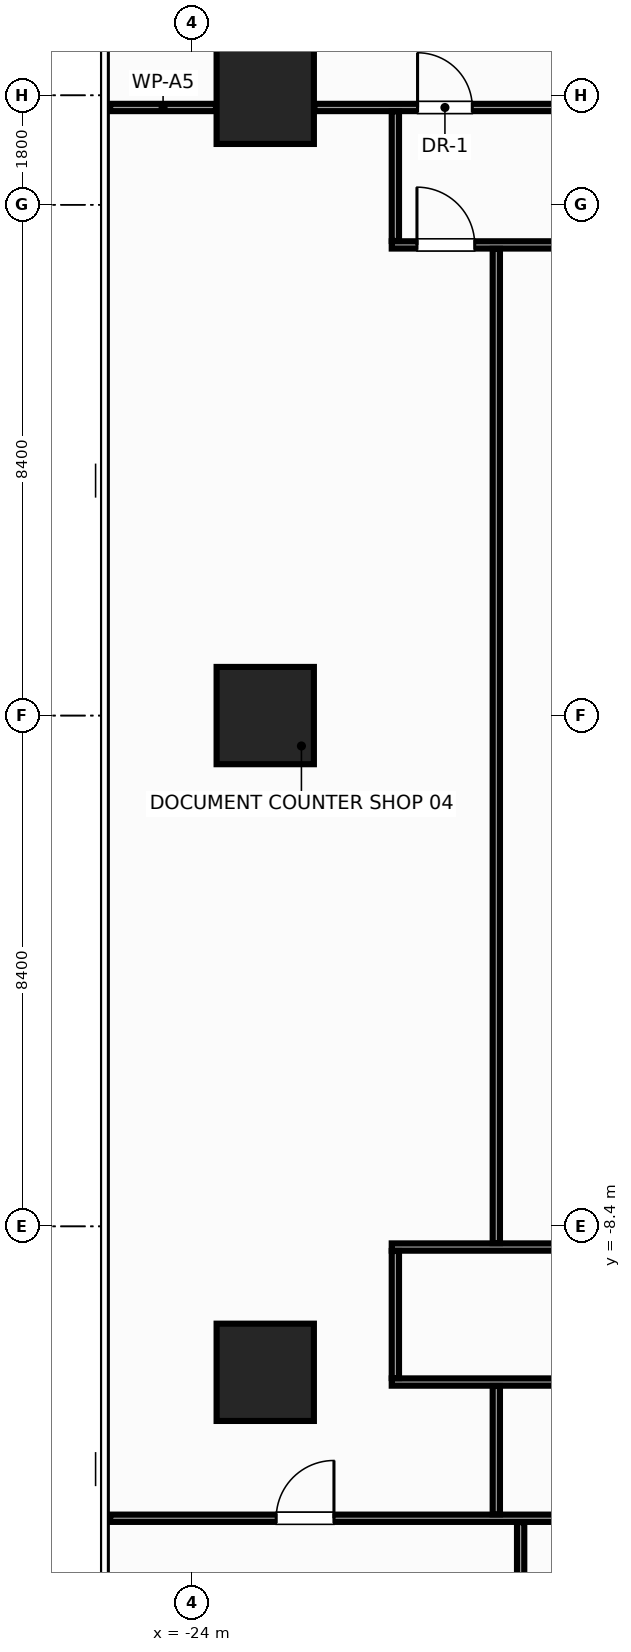
"""IFC4 building model, lengths in metres.
Left out: names, types, materials, properties, quantities, classifications, styles, units other than length and angle.
Written with IfcOpenShell. Run it as: python <this file> out.ifc"""

import sys

from ifc_helpers import new_model, si_unit, direction, frame, frame_2d, origin, origin_2d, place, context, subcontext, project, spatial, rectangle, extrude, source, transform, mapped, element, fill, save


model = new_model("IFC4")
c1 = context("Model", 3, precision=1e-05, world=origin(), true_north=direction((0.0, 1.0)))
c2 = subcontext(c1, "Body", "Model", "MODEL_VIEW")
j1 = project(units=[si_unit("LENGTHUNIT", "METRE"), si_unit("PLANEANGLEUNIT", "RADIAN")], contexts=[c1])
p1 = place(None, origin())
s1 = spatial("IfcSite", under=j1, at=p1, CompositionType="ELEMENT")
p2 = place(p1, origin())
s2 = spatial("IfcBuilding", under=s1, at=p2, CompositionType="ELEMENT")
p3 = place(p2, frame((0.0, 0.0, 88.4)))
s3 = spatial("IfcBuildingStorey", under=s2, at=p3, CompositionType="ELEMENT", Elevation=88.4)
m1 = source(origin(), c2, "Body", "SweptSolid", [
    extrude(rectangle(XDim=1.6, YDim=1.6, at=origin_2d()), origin(), (0.0, 0.0, 1.0), 3.6),
])
for number, where, z_axis, x_axis in (
    (1, (-22.8, -10.8, 0.0), (0.0, 0.0, 1.0), (1.0, 0.0, 0.0)),
    (2, (-22.8, 0.0, 0.0), (0.0, 0.0, 1.0), (1.0, 0.0, 0.0)),
    (3, (-22.8, 10.2, 0.0), (0.0, 0.0, 1.0), (1.0, 0.0, 0.0)),
):
    element("IfcColumn", number, at=place(p3, frame(where, z_axis=z_axis, x_axis=x_axis)), inside=s3, PredefinedType="COLUMN", context=c2, shape_type="MappedRepresentation", body=[
        mapped(m1, transform((0.0, 0.0, 0.0), x_axis=(1.0, 0.0, 0.0), y_axis=(0.0, 1.0, 0.0), z_axis=(0.0, 0.0, 1.0), scale=1.0)),
    ])
m2 = source(origin(), c2, "Body", "SweptSolid", [
    extrude(rectangle(XDim=1.74, YDim=0.12, at=frame_2d((0.87, 0.0))), origin(), (0.0, 0.0, 1.0), 3.36),
])
p4 = place(p3, frame((-25.35, 10.0, 0.0), z_axis=(0.0, 0.0, 1.0), x_axis=(1.0, 0.0, 0.0)))
e4 = element("IfcWall", 4, at=p4, inside=s3, PredefinedType="PARTITIONING", context=c2, shape_type="MappedRepresentation", body=[
    mapped(m2, transform((0.0, 0.0, 0.0), x_axis=(1.0, 0.0, 0.0), y_axis=(0.0, 1.0, 0.0), z_axis=(0.0, 0.0, 1.0), scale=1.0)),
])
m3 = source(origin(), c2, "Body", "SweptSolid", [
    extrude(rectangle(XDim=4.38, YDim=0.12, at=frame_2d((2.19, 0.0))), origin(), (0.0, 0.0, 1.0), 2.745),
])
p5 = place(p3, frame((-21.99, 10.0, 0.0), z_axis=(0.0, 0.0, 1.0), x_axis=(1.0, 0.0, 0.0)))
e5 = element("IfcWall", 5, at=p5, inside=s3, PredefinedType="PARTITIONING", context=c2, shape_type="MappedRepresentation", body=[
    mapped(m3, transform((0.0, 0.0, 0.0), x_axis=(1.0, 0.0, 0.0), y_axis=(0.0, 1.0, 0.0), z_axis=(0.0, 0.0, 1.0), scale=1.0)),
])
p6 = place(p5, frame((1.695, 0.0, 0.0)))
e6 = element("IfcOpeningElement", 6, at=p6, cuts=e5, PredefinedType="OPENING", context=c2, shape_type="SweptSolid", body=[
    extrude(rectangle(XDim=0.9, YDim=2.15, at=frame_2d((0.45, 1.075))), frame((0.0, 0.072, 0.0), z_axis=(0.0, -1.0, 0.0), x_axis=(1.0, 0.0, 0.0)), (0.0, 0.0, 1.0), 0.144),
])
m4 = source(origin(), c2, "Body", "SweptSolid", [
    extrude(rectangle(XDim=16.8, YDim=0.12, at=frame_2d((8.4, 0.0))), origin(), (0.0, 0.0, 1.0), 2.745),
])
p7 = place(p3, frame((-20.72, 7.74, 0.0), z_axis=(0.0, 0.0, 1.0), x_axis=(1.0, 0.0, 0.0)))
e7 = element("IfcWall", 7, at=p7, inside=s3, PredefinedType="PARTITIONING", context=c2, shape_type="MappedRepresentation", body=[
    mapped(m4, transform((0.0, 0.0, 0.0), x_axis=(1.0, 0.0, 0.0), y_axis=(0.0, 1.0, 0.0), z_axis=(0.0, 0.0, 1.0), scale=1.0)),
])
p8 = place(p7, frame((8.825, 0.0, 0.0)))
e8 = element("IfcOpeningElement", 8, at=p8, cuts=e7, PredefinedType="OPENING", context=c2, shape_type="SweptSolid", body=[
    extrude(rectangle(XDim=0.95, YDim=2.15, at=frame_2d((0.475, 1.075))), frame((0.0, 0.072, 0.0), z_axis=(0.0, -1.0, 0.0), x_axis=(1.0, 0.0, 0.0)), (0.0, 0.0, 1.0), 0.144),
])
p9 = place(p7, frame((0.415, 0.0, 0.0)))
e9 = element("IfcOpeningElement", 9, at=p9, cuts=e7, PredefinedType="OPENING", context=c2, shape_type="SweptSolid", body=[
    extrude(rectangle(XDim=0.95, YDim=2.15, at=frame_2d((0.475, 1.075))), frame((0.0, 0.072, 0.0), z_axis=(0.0, -1.0, 0.0), x_axis=(1.0, 0.0, 0.0)), (0.0, 0.0, 1.0), 0.144),
])
p10 = place(p3, frame((-20.72, -8.74, 0.0), z_axis=(0.0, 0.0, 1.0), x_axis=(1.0, 0.0, 0.0)))
e10 = element("IfcWall", 10, at=p10, inside=s3, PredefinedType="PARTITIONING", context=c2, shape_type="MappedRepresentation", body=[
    mapped(m4, transform((0.0, 0.0, 0.0), x_axis=(1.0, 0.0, 0.0), y_axis=(0.0, 1.0, 0.0), z_axis=(0.0, 0.0, 1.0), scale=1.0)),
])
m5 = source(origin(), c2, "Body", "SweptSolid", [
    extrude(rectangle(XDim=3.11, YDim=0.12, at=frame_2d((1.555, 0.0))), origin(), (0.0, 0.0, 1.0), 2.745),
])
p11 = place(p3, frame((-20.72, -10.96, 0.0), z_axis=(0.0, 0.0, 1.0), x_axis=(1.0, 0.0, 0.0)))
e11 = element("IfcWall", 11, at=p11, inside=s3, PredefinedType="PARTITIONING", context=c2, shape_type="MappedRepresentation", body=[
    mapped(m5, transform((0.0, 0.0, 0.0), x_axis=(1.0, 0.0, 0.0), y_axis=(0.0, 1.0, 0.0), z_axis=(0.0, 0.0, 1.0), scale=1.0)),
])
m6 = source(origin(), c2, "Body", "SweptSolid", [
    extrude(rectangle(XDim=2.13, YDim=0.12, at=frame_2d((1.065, 0.0))), origin(), (0.0, 0.0, 1.0), 3.36),
])
p12 = place(p3, frame((-20.66, 7.805, 0.0), z_axis=(0.0, 0.0, 1.0), x_axis=(0.0, 1.0, 0.0)))
e12 = element("IfcWall", 12, at=p12, inside=s3, PredefinedType="PARTITIONING", context=c2, shape_type="MappedRepresentation", body=[
    mapped(m6, transform((0.0, 0.0, 0.0), x_axis=(1.0, 0.0, 0.0), y_axis=(0.0, 1.0, 0.0), z_axis=(0.0, 0.0, 1.0), scale=1.0)),
])
m7 = source(origin(), c2, "Body", "SweptSolid", [
    extrude(rectangle(XDim=2.09, YDim=0.12, at=frame_2d((1.045, 0.0))), origin(), (0.0, 0.0, 1.0), 3.36),
])
p13 = place(p3, frame((-20.66, -10.895, 0.0), z_axis=(0.0, 0.0, 1.0), x_axis=(0.0, 1.0, 0.0)))
e13 = element("IfcWall", 13, at=p13, inside=s3, PredefinedType="PARTITIONING", context=c2, shape_type="MappedRepresentation", body=[
    mapped(m7, transform((0.0, 0.0, 0.0), x_axis=(1.0, 0.0, 0.0), y_axis=(0.0, 1.0, 0.0), z_axis=(0.0, 0.0, 1.0), scale=1.0)),
])
m8 = source(origin(), c2, "Body", "SweptSolid", [
    extrude(rectangle(XDim=50.7, YDim=0.12, at=frame_2d((25.35, 0.0))), origin(), (0.0, 0.0, 1.0), 2.945),
])
p14 = place(p3, frame((-25.35, -13.2, 0.0), z_axis=(0.0, 0.0, 1.0), x_axis=(1.0, 0.0, 0.0)))
e14 = element("IfcWall", 14, at=p14, inside=s3, PredefinedType="PARTITIONING", context=c2, shape_type="MappedRepresentation", body=[
    mapped(m8, transform((0.0, 0.0, 0.0), x_axis=(1.0, 0.0, 0.0), y_axis=(0.0, 1.0, 0.0), z_axis=(0.0, 0.0, 1.0), scale=1.0)),
])
p15 = place(p14, frame((46.92, 0.0, 0.0)))
e15 = element("IfcOpeningElement", 15, at=p15, cuts=e14, PredefinedType="OPENING", context=c2, shape_type="SweptSolid", body=[
    extrude(rectangle(XDim=0.95, YDim=2.15, at=frame_2d((0.475, 1.075))), frame((0.0, 0.072, 0.0), z_axis=(0.0, -1.0, 0.0), x_axis=(1.0, 0.0, 0.0)), (0.0, 0.0, 1.0), 0.144),
])
p16 = place(p14, frame((2.73, 0.0, 0.0)))
e16 = element("IfcOpeningElement", 16, at=p16, cuts=e14, PredefinedType="OPENING", context=c2, shape_type="SweptSolid", body=[
    extrude(rectangle(XDim=0.95, YDim=2.15, at=frame_2d((0.475, 1.075))), frame((0.0, 0.072, 0.0), z_axis=(0.0, -1.0, 0.0), x_axis=(1.0, 0.0, 0.0)), (0.0, 0.0, 1.0), 0.144),
])
p17 = place(p14, frame((9.375, 0.0, 0.0)))
e17 = element("IfcOpeningElement", 17, at=p17, cuts=e14, PredefinedType="OPENING", context=c2, shape_type="SweptSolid", body=[
    extrude(rectangle(XDim=0.95, YDim=2.15, at=frame_2d((0.475, 1.075))), frame((0.0, 0.072, 0.0), z_axis=(0.0, -1.0, 0.0), x_axis=(1.0, 0.0, 0.0)), (0.0, 0.0, 1.0), 0.144),
])
p18 = place(p14, frame((15.875, 0.0, 0.0)))
e18 = element("IfcOpeningElement", 18, at=p18, cuts=e14, PredefinedType="OPENING", context=c2, shape_type="SweptSolid", body=[
    extrude(rectangle(XDim=0.95, YDim=2.15, at=frame_2d((0.475, 1.075))), frame((0.0, 0.072, 0.0), z_axis=(0.0, -1.0, 0.0), x_axis=(1.0, 0.0, 0.0)), (0.0, 0.0, 1.0), 0.144),
])
p19 = place(p14, frame((24.875, 0.0, 0.0)))
e19 = element("IfcOpeningElement", 19, at=p19, cuts=e14, PredefinedType="OPENING", context=c2, shape_type="SweptSolid", body=[
    extrude(rectangle(XDim=0.95, YDim=2.15, at=frame_2d((0.475, 1.075))), frame((0.0, 0.072, 0.0), z_axis=(0.0, -1.0, 0.0), x_axis=(1.0, 0.0, 0.0)), (0.0, 0.0, 1.0), 0.144),
])
p20 = place(p14, frame((35.375, 0.0, 0.0)))
e20 = element("IfcOpeningElement", 20, at=p20, cuts=e14, PredefinedType="OPENING", context=c2, shape_type="SweptSolid", body=[
    extrude(rectangle(XDim=0.95, YDim=2.15, at=frame_2d((0.475, 1.075))), frame((0.0, 0.072, 0.0), z_axis=(0.0, -1.0, 0.0), x_axis=(1.0, 0.0, 0.0)), (0.0, 0.0, 1.0), 0.144),
])
p21 = place(p14, frame((40.675, 0.0, 0.0)))
e21 = element("IfcOpeningElement", 21, at=p21, cuts=e14, PredefinedType="OPENING", context=c2, shape_type="SweptSolid", body=[
    extrude(rectangle(XDim=0.95, YDim=2.15, at=frame_2d((0.475, 1.075))), frame((0.0, 0.072, 0.0), z_axis=(0.0, -1.0, 0.0), x_axis=(1.0, 0.0, 0.0)), (0.0, 0.0, 1.0), 0.144),
])
m9 = source(origin(), c2, "Body", "SweptSolid", [
    extrude(rectangle(XDim=2.11, YDim=0.12, at=frame_2d((1.055, 0.0))), origin(), (0.0, 0.0, 1.0), 3.36),
])
p22 = place(p3, frame((-19.0, -13.135, 0.0), z_axis=(0.0, 0.0, 1.0), x_axis=(0.0, 1.0, 0.0)))
e22 = element("IfcWall", 22, at=p22, inside=s3, PredefinedType="PARTITIONING", context=c2, shape_type="MappedRepresentation", body=[
    mapped(m9, transform((0.0, 0.0, 0.0), x_axis=(1.0, 0.0, 0.0), y_axis=(0.0, 1.0, 0.0), z_axis=(0.0, 0.0, 1.0), scale=1.0)),
])
m10 = source(origin(), c2, "Body", "SweptSolid", [
    extrude(rectangle(XDim=16.35, YDim=0.12, at=frame_2d((8.175, 0.0))), origin(), (0.0, 0.0, 1.0), 2.745),
])
p23 = place(p3, frame((-19.0, -8.675, 0.0), z_axis=(0.0, 0.0, 1.0), x_axis=(0.0, 1.0, 0.0)))
e23 = element("IfcWall", 23, at=p23, inside=s3, PredefinedType="PARTITIONING", context=c2, shape_type="MappedRepresentation", body=[
    mapped(m10, transform((0.0, 0.0, 0.0), x_axis=(1.0, 0.0, 0.0), y_axis=(0.0, 1.0, 0.0), z_axis=(0.0, 0.0, 1.0), scale=1.0)),
])
m11 = source(origin(), c2, "Body", "SweptSolid", [
    extrude(rectangle(XDim=12.385, YDim=0.12, at=frame_2d((6.192, 0.0))), origin(), (0.0, 0.0, 1.0), 2.745),
])
p24 = place(p3, frame((-18.6, -25.65, 0.0), z_axis=(0.0, 0.0, 1.0), x_axis=(0.0, 1.0, 0.0)))
e24 = element("IfcWall", 24, at=p24, inside=s3, PredefinedType="PARTITIONING", context=c2, shape_type="MappedRepresentation", body=[
    mapped(m11, transform((0.0, 0.0, 0.0), x_axis=(1.0, 0.0, 0.0), y_axis=(0.0, 1.0, 0.0), z_axis=(0.0, 0.0, 1.0), scale=1.0)),
])
m12 = source(origin(), c2, "Body", "SweptSolid", [
    extrude(rectangle(XDim=0.9, YDim=2.15, at=frame_2d((0.45, 1.075))), frame((0.0, 0.025, 0.0), z_axis=(0.0, -1.0, 0.0), x_axis=(1.0, 0.0, 0.0)), (0.0, 0.0, 1.0), 0.05),
])
p25 = place(p6, origin())
e25 = element("IfcDoor", 25, at=p25, inside=s3, OperationType="SINGLE_SWING_LEFT", PredefinedType="DOOR", context=c2, shape_type="MappedRepresentation", body=[
    mapped(m12, transform((0.0, 0.0, 0.0), x_axis=(1.0, 0.0, 0.0), y_axis=(0.0, 1.0, 0.0), z_axis=(0.0, 0.0, 1.0), scale=1.0)),
])
fill(e6, e25)
m13 = source(origin(), c2, "Body", "SweptSolid", [
    extrude(rectangle(XDim=0.95, YDim=2.15, at=frame_2d((0.475, 1.075))), frame((0.0, 0.025, 0.0), z_axis=(0.0, -1.0, 0.0), x_axis=(1.0, 0.0, 0.0)), (0.0, 0.0, 1.0), 0.05),
])
p26 = place(p9, origin())
e26 = element("IfcDoor", 26, at=p26, inside=s3, OperationType="SINGLE_SWING_LEFT", PredefinedType="DOOR", context=c2, shape_type="MappedRepresentation", body=[
    mapped(m13, transform((0.0, 0.0, 0.0), x_axis=(1.0, 0.0, 0.0), y_axis=(0.0, 1.0, 0.0), z_axis=(0.0, 0.0, 1.0), scale=1.0)),
])
fill(e9, e26)
p27 = place(p16, origin())
e27 = element("IfcDoor", 27, at=p27, inside=s3, OperationType="SINGLE_SWING_RIGHT", PredefinedType="DOOR", context=c2, shape_type="MappedRepresentation", body=[
    mapped(m13, transform((0.0, 0.0, 0.0), x_axis=(1.0, 0.0, 0.0), y_axis=(0.0, 1.0, 0.0), z_axis=(0.0, 0.0, 1.0), scale=1.0)),
])
fill(e16, e27)
save(model, sys.argv[1])
